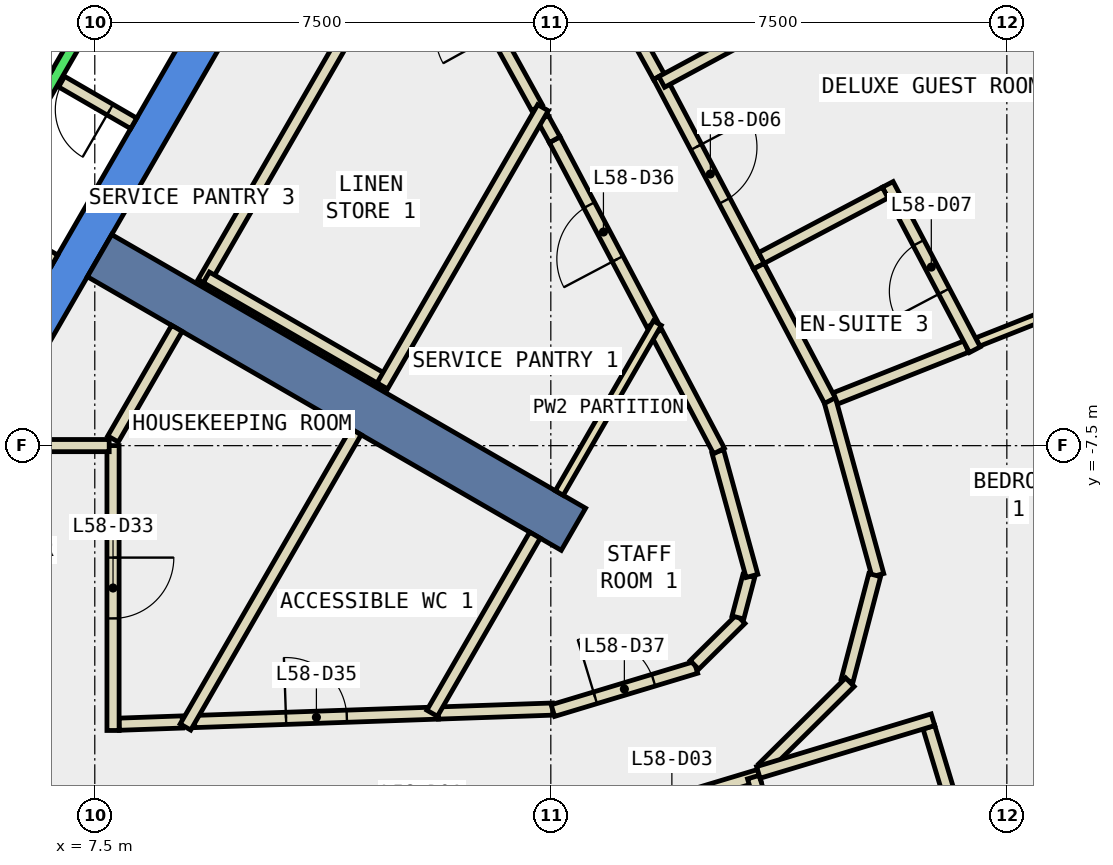
"""IFC4 building model, lengths in metres.
Left out: names, types, materials, properties, quantities, classifications, styles, units other than length and angle.
Written with IfcOpenShell. Run it as: python <this file> out.ifc"""

import sys

from ifc_helpers import new_model, si_unit, direction, frame, frame_2d, origin, origin_2d, place, context, subcontext, project, spatial, polyline, rectangle, outline, extrude, element, fill, save


model = new_model("IFC4")
c1 = context("Model", 3, precision=1e-05, world=origin(), true_north=direction((0.0, 1.0)))
c2 = subcontext(c1, "Body", "Model", "MODEL_VIEW")
j1 = project(units=[si_unit("LENGTHUNIT", "METRE"), si_unit("PLANEANGLEUNIT", "RADIAN")], contexts=[c1])
p1 = place(None, origin())
s1 = spatial("IfcSite", under=j1, at=p1, CompositionType="ELEMENT")
p2 = place(p1, origin())
s2 = spatial("IfcBuilding", under=s1, at=p2, CompositionType="ELEMENT")
p3 = place(p2, frame((0.0, 0.0, 255.8)))
s3 = spatial("IfcBuildingStorey", under=s2, at=p3, CompositionType="ELEMENT", Elevation=255.8)
p4 = place(p3, frame((23.856, -13.774, -0.34), z_axis=(0.0, 0.0, 1.0), x_axis=(-0.866025403784, 0.5, 0.0)))
e1 = element("IfcColumn", 1, at=p4, inside=s3, PredefinedType="COLUMN", context=c2, shape_type="SweptSolid", body=[
    extrude(rectangle(XDim=1.8, YDim=1.8, at=origin_2d()), origin(), (0.0, 0.0, 1.0), 3.6),
])
p5 = place(p3, frame((0.0, 0.0, -0.34)))
e2 = element("IfcWall", 2, at=p5, inside=s3, PredefinedType="SHEAR", context=c2, shape_type="SweptSolid", body=[
    extrude(outline(polyline([(5.774, -7.5), (11.547, 2.5), (10.854, 2.5), (5.427, -6.9), (5.774, -7.5)])), origin(), (0.0, 0.0, 1.0), 3.6),
])
p6 = place(p3, frame((7.578, -4.375, -0.34), z_axis=(0.0, 0.0, 1.0), x_axis=(0.866024315419, -0.5000018851, 0.0)))
e3 = element("IfcWall", 3, at=p6, inside=s3, PredefinedType="SHEAR", context=c2, shape_type="SweptSolid", body=[
    extrude(rectangle(XDim=9.0, YDim=0.8, at=frame_2d((4.5, 0.0))), origin(), (0.0, 0.0, 1.0), 3.6),
])
p7 = place(p3, frame((25.012, -4.07, 0.0), z_axis=(0.0, 0.0, 1.0), x_axis=(-0.466663589714, 0.884434900959, 0.0)))
e4 = element("IfcWall", 4, at=p7, inside=s3, PredefinedType="STANDARD", context=c2, shape_type="SweptSolid", body=[
    extrude(rectangle(XDim=5.638, YDim=0.3, at=frame_2d((2.819, 0.0))), origin(), (0.0, 0.0, 1.0), 3.26),
])
p8 = place(p7, frame((0.459, 0.0, 0.9)))
e5 = element("IfcOpeningElement", 5, at=p8, cuts=e4, PredefinedType="OPENING", context=c2, shape_type="SweptSolid", body=[
    extrude(rectangle(XDim=1.9, YDim=2.0, at=frame_2d((0.95, 1.0))), frame((0.0, 0.16, 0.0), z_axis=(0.0, -1.0, 0.0), x_axis=(1.0, 0.0, 0.0)), (0.0, 0.0, 1.0), 0.32),
])
p9 = place(p7, frame((3.278, 0.0, 0.9)))
e6 = element("IfcOpeningElement", 6, at=p9, cuts=e4, PredefinedType="OPENING", context=c2, shape_type="SweptSolid", body=[
    extrude(rectangle(XDim=1.9, YDim=2.0, at=frame_2d((0.95, 1.0))), frame((0.0, 0.16, 0.0), z_axis=(0.0, -1.0, 0.0), x_axis=(1.0, 0.0, 0.0)), (0.0, 0.0, 1.0), 0.32),
])
p10 = place(p3, frame((7.9, -12.081, 0.0), z_axis=(0.0, 0.0, 1.0), x_axis=(0.999365240621, 0.035624652105, 0.0)))
e7 = element("IfcWall", 7, at=p10, inside=s3, PredefinedType="PARTITIONING", context=c2, shape_type="SweptSolid", body=[
    extrude(rectangle(XDim=1.042, YDim=0.2, at=frame_2d((0.521, 0.0))), origin(), (0.0, 0.0, 1.0), 3.26),
])
p11 = place(p3, frame((14.773, -1.941, 0.0), z_axis=(0.0, 0.0, 1.0), x_axis=(-0.483431586589, 0.875382145744, 0.0)))
e8 = element("IfcWall", 8, at=p11, inside=s3, PredefinedType="PARTITIONING", context=c2, shape_type="SweptSolid", body=[
    extrude(rectangle(XDim=3.771, YDim=0.2, at=frame_2d((1.885, 0.0))), origin(), (0.0, 0.0, 1.0), 3.26),
])
p12 = place(p11, frame((1.385, 0.0, 0.0)))
e9 = element("IfcOpeningElement", 9, at=p12, cuts=e8, PredefinedType="OPENING", context=c2, shape_type="SweptSolid", body=[
    extrude(rectangle(XDim=1.0, YDim=2.1, at=frame_2d((0.5, 1.05))), frame((0.0, 0.11, 0.0), z_axis=(0.0, -1.0, 0.0), x_axis=(1.0, 0.0, 0.0)), (0.0, 0.0, 1.0), 0.22),
])
p13 = place(p3, frame((9.141, -12.037, 0.0), z_axis=(0.0, 0.0, 1.0), x_axis=(0.999388955878, 0.034953038062, 0.0)))
e10 = element("IfcWall", 10, at=p13, inside=s3, PredefinedType="PARTITIONING", context=c2, shape_type="SweptSolid", body=[
    extrude(rectangle(XDim=4.009, YDim=0.2, at=frame_2d((2.005, 0.0))), origin(), (0.0, 0.0, 1.0), 3.26),
])
p14 = place(p13, frame((1.505, 0.0, 0.0)))
e11 = element("IfcOpeningElement", 11, at=p14, cuts=e10, PredefinedType="OPENING", context=c2, shape_type="SweptSolid", body=[
    extrude(rectangle(XDim=1.0, YDim=2.1, at=frame_2d((0.5, 1.05))), frame((0.0, 0.11, 0.0), z_axis=(0.0, -1.0, 0.0), x_axis=(1.0, 0.0, 0.0)), (0.0, 0.0, 1.0), 0.22),
])
p15 = place(p3, frame((16.667, -5.505, 0.0), z_axis=(0.0, 0.0, 1.0), x_axis=(-0.466812680399, 0.884356218624, 0.0)))
e12 = element("IfcWall", 12, at=p15, inside=s3, PredefinedType="PARTITIONING", context=c2, shape_type="SweptSolid", body=[
    extrude(rectangle(XDim=3.434, YDim=0.2, at=frame_2d((1.717, 0.0))), origin(), (0.0, 0.0, 1.0), 3.26),
])
p16 = place(p15, frame((1.217, 0.0, 0.0)))
e13 = element("IfcOpeningElement", 13, at=p16, cuts=e12, PredefinedType="OPENING", context=c2, shape_type="SweptSolid", body=[
    extrude(rectangle(XDim=1.0, YDim=2.1, at=frame_2d((0.5, 1.05))), frame((0.0, 0.11, 0.0), z_axis=(0.0, -1.0, 0.0), x_axis=(1.0, 0.0, 0.0)), (0.0, 0.0, 1.0), 0.22),
])
p17 = place(p3, frame((15.064, -2.468, 0.0), z_axis=(0.0, 0.0, 1.0), x_axis=(-0.482338449744, 0.875984942735, 0.0)))
e14 = element("IfcWall", 14, at=p17, inside=s3, PredefinedType="PARTITIONING", context=c2, shape_type="SweptSolid", body=[
    extrude(rectangle(XDim=0.402, YDim=0.2, at=frame_2d((0.201, 0.0))), origin(), (0.0, 0.0, 1.0), 3.26),
])
p18 = place(p3, frame((13.148, -11.897, 0.0), z_axis=(0.0, 0.0, 1.0), x_axis=(0.999405229262, 0.034484601243, 0.0)))
e15 = element("IfcWall", 15, at=p18, inside=s3, PredefinedType="PARTITIONING", context=c2, shape_type="SweptSolid", body=[
    extrude(rectangle(XDim=1.883, YDim=0.2, at=frame_2d((0.942, 0.0))), origin(), (0.0, 0.0, 1.0), 3.26),
])
p19 = place(p3, frame((15.034, -11.857, 0.0), z_axis=(0.0, 0.0, 1.0), x_axis=(0.957338084933, 0.288970225346, 0.0)))
e16 = element("IfcWall", 16, at=p19, inside=s3, PredefinedType="PARTITIONING", context=c2, shape_type="SweptSolid", body=[
    extrude(rectangle(XDim=2.457, YDim=0.2, at=frame_2d((1.229, 0.0))), origin(), (0.0, 0.0, 1.0), 3.26),
])
p20 = place(p19, frame((0.728, 0.0, 0.0)))
e17 = element("IfcOpeningElement", 17, at=p20, cuts=e16, PredefinedType="OPENING", context=c2, shape_type="SweptSolid", body=[
    extrude(rectangle(XDim=1.0, YDim=2.1, at=frame_2d((0.5, 1.05))), frame((0.0, 0.11, 0.0), z_axis=(0.0, -1.0, 0.0), x_axis=(1.0, 0.0, 0.0)), (0.0, 0.0, 1.0), 0.22),
])
p21 = place(p3, frame((17.362, -11.106, 0.0), z_axis=(0.0, 0.0, 1.0), x_axis=(0.710859741153, 0.703333795866, 0.0)))
e18 = element("IfcWall", 18, at=p21, inside=s3, PredefinedType="PARTITIONING", context=c2, shape_type="SweptSolid", body=[
    extrude(rectangle(XDim=1.071, YDim=0.2, at=frame_2d((0.535, 0.0))), origin(), (0.0, 0.0, 1.0), 3.26),
])
p22 = place(p3, frame((18.077, -10.326, 0.0), z_axis=(0.0, 0.0, 1.0), x_axis=(0.254782174857, 0.966998471237, 0.0)))
e19 = element("IfcWall", 19, at=p22, inside=s3, PredefinedType="PARTITIONING", context=c2, shape_type="SweptSolid", body=[
    extrude(rectangle(XDim=0.707, YDim=0.2, at=frame_2d((0.354, 0.0))), origin(), (0.0, 0.0, 1.0), 3.26),
])
p23 = place(p3, frame((18.308, -9.642, 0.0), z_axis=(0.0, 0.0, 1.0), x_axis=(-0.264859637197, 0.96428697626, 0.0)))
e20 = element("IfcWall", 20, at=p23, inside=s3, PredefinedType="PARTITIONING", context=c2, shape_type="SweptSolid", body=[
    extrude(rectangle(XDim=2.122, YDim=0.2, at=frame_2d((1.061, 0.0))), origin(), (0.0, 0.0, 1.0), 3.26),
])
p24 = place(p3, frame((17.766, -7.588, 0.0), z_axis=(0.0, 0.0, 1.0), x_axis=(-0.466727344864, 0.884401258228, 0.0)))
e21 = element("IfcWall", 21, at=p24, inside=s3, PredefinedType="PARTITIONING", context=c2, shape_type="SweptSolid", body=[
    extrude(rectangle(XDim=2.205, YDim=0.2, at=frame_2d((1.103, 0.0))), origin(), (0.0, 0.0, 1.0), 3.26),
])
p25 = place(p3, frame((18.427, -12.922, 0.0), z_axis=(0.0, 0.0, 1.0), x_axis=(-0.957336631432, -0.288975040651, 0.0)))
e22 = element("IfcWall", 22, at=p25, inside=s3, PredefinedType="PARTITIONING", context=c2, shape_type="SweptSolid", body=[
    extrude(rectangle(XDim=3.0, YDim=0.2, at=frame_2d((1.5, 0.0))), origin(), (0.0, 0.0, 1.0), 3.26),
])
p26 = place(p25, frame((1.0, 0.0, 0.0)))
e23 = element("IfcOpeningElement", 23, at=p26, cuts=e22, PredefinedType="OPENING", context=c2, shape_type="SweptSolid", body=[
    extrude(rectangle(XDim=1.0, YDim=2.1, at=frame_2d((0.5, 1.05))), frame((0.0, 0.11, 0.0), z_axis=(0.0, -1.0, 0.0), x_axis=(1.0, 0.0, 0.0)), (0.0, 0.0, 1.0), 0.22),
])
p27 = place(p3, frame((19.564, -6.662, 0.0), z_axis=(0.0, 0.0, 1.0), x_axis=(0.264876135597, -0.96428244451, 0.0)))
e24 = element("IfcWall", 24, at=p27, inside=s3, PredefinedType="PARTITIONING", context=c2, shape_type="SweptSolid", body=[
    extrude(rectangle(XDim=3.077, YDim=0.2, at=frame_2d((1.538, 0.0))), origin(), (0.0, 0.0, 1.0), 3.26),
])
p28 = place(p3, frame((20.327, -9.629, 0.0), z_axis=(0.0, 0.0, 1.0), x_axis=(-0.253192482031, -0.967415922467, 0.0)))
e25 = element("IfcWall", 25, at=p28, inside=s3, PredefinedType="PARTITIONING", context=c2, shape_type="SweptSolid", body=[
    extrude(rectangle(XDim=1.792, YDim=0.2, at=frame_2d((0.896, 0.0))), origin(), (0.0, 0.0, 1.0), 3.26),
])
p29 = place(p3, frame((19.919, -11.39, 0.0), z_axis=(0.0, 0.0, 1.0), x_axis=(-0.71104667794, -0.70314480855, 0.0)))
e26 = element("IfcWall", 26, at=p29, inside=s3, PredefinedType="PARTITIONING", context=c2, shape_type="SweptSolid", body=[
    extrude(rectangle(XDim=2.008, YDim=0.2, at=frame_2d((1.004, 0.0))), origin(), (0.0, 0.0, 1.0), 3.26),
])
p30 = place(p3, frame((16.778, -1.429, 0.0), z_axis=(0.0, 0.0, 1.0), x_axis=(0.466493865945, -0.884524433261, 0.0)))
e27 = element("IfcWall", 27, at=p30, inside=s3, PredefinedType="PARTITIONING", context=c2, shape_type="SweptSolid", body=[
    extrude(rectangle(XDim=3.526, YDim=0.2, at=frame_2d((1.763, 0.0))), origin(), (0.0, 0.0, 1.0), 3.26),
])
p31 = place(p30, frame((1.313, 0.0, 0.0)))
e28 = element("IfcOpeningElement", 28, at=p31, cuts=e27, PredefinedType="OPENING", context=c2, shape_type="SweptSolid", body=[
    extrude(rectangle(XDim=1.0, YDim=2.1, at=frame_2d((0.5, 1.05))), frame((0.0, 0.11, 0.0), z_axis=(0.0, -1.0, 0.0), x_axis=(1.0, 0.0, 0.0)), (0.0, 0.0, 1.0), 0.22),
])
p32 = place(p3, frame((18.423, -4.548, 0.0), z_axis=(0.0, 0.0, 1.0), x_axis=(0.466792565793, -0.884366835946, 0.0)))
e29 = element("IfcWall", 29, at=p32, inside=s3, PredefinedType="PARTITIONING", context=c2, shape_type="SweptSolid", body=[
    extrude(rectangle(XDim=2.5, YDim=0.2, at=frame_2d((1.25, 0.0))), origin(), (0.0, 0.0, 1.0), 3.26),
])
p33 = place(p3, frame((15.715, 0.491, 0.0), z_axis=(0.0, 0.0, 1.0), x_axis=(0.483421428323, -0.875387755591, 0.0)))
e30 = element("IfcWall", 30, at=p33, inside=s3, PredefinedType="PARTITIONING", context=c2, shape_type="SweptSolid", body=[
    extrude(rectangle(XDim=2.194, YDim=0.2, at=frame_2d((1.097, 0.0))), origin(), (0.0, 0.0, 1.0), 3.26),
])
p34 = place(p3, frame((5.888, -3.902, 0.0), z_axis=(0.0, 0.0, 1.0), x_axis=(0.86621513555, -0.499671230855, 0.0)))
e31 = element("IfcWall", 31, at=p34, inside=s3, PredefinedType="PARTITIONING", context=c2, shape_type="SweptSolid", body=[
    extrude(rectangle(XDim=1.1, YDim=0.2, at=frame_2d((0.55, 0.0))), origin(), (0.0, 0.0, 1.0), 3.26),
])
p35 = place(p3, frame((8.14, -2.2, 0.0), z_axis=(0.0, 0.0, 1.0), x_axis=(-0.865545166185, 0.500830874941, 0.0)))
e32 = element("IfcWall", 32, at=p35, inside=s3, PredefinedType="PARTITIONING", context=c2, shape_type="SweptSolid", body=[
    extrude(rectangle(XDim=1.5, YDim=0.2, at=frame_2d((0.75, 0.0))), origin(), (0.0, 0.0, 1.0), 3.26),
])
p36 = place(p35, frame((0.45, 0.0, 0.0)))
e33 = element("IfcOpeningElement", 33, at=p36, cuts=e32, PredefinedType="OPENING", context=c2, shape_type="SweptSolid", body=[
    extrude(rectangle(XDim=0.9, YDim=2.1, at=frame_2d((0.45, 1.05))), frame((0.0, 0.11, 0.0), z_axis=(0.0, -1.0, 0.0), x_axis=(1.0, 0.0, 0.0)), (0.0, 0.0, 1.0), 0.22),
])
p37 = place(p3, frame((7.8, -7.39, 0.0), z_axis=(0.0, 0.0, 1.0), x_axis=(0.499977374825, 0.866038466041, 0.0)))
e34 = element("IfcWall", 34, at=p37, inside=s3, PredefinedType="PARTITIONING", context=c2, shape_type="SweptSolid", body=[
    extrude(rectangle(XDim=2.1, YDim=0.2, at=frame_2d((1.05, 0.0))), origin(), (0.0, 0.0, 1.0), 3.26),
])
p38 = place(p3, frame((9.285, -4.818, 0.0), z_axis=(0.0, 0.0, 1.0), x_axis=(0.499962569651, 0.866047013128, 0.0)))
e35 = element("IfcWall", 35, at=p38, inside=s3, PredefinedType="PARTITIONING", context=c2, shape_type="SweptSolid", body=[
    extrude(rectangle(XDim=7.334, YDim=0.2, at=frame_2d((3.667, 0.0))), origin(), (0.0, 0.0, 1.0), 3.26),
])
p39 = place(p3, frame((7.8, -7.499, 0.0), z_axis=(0.0, 0.0, 1.0), x_axis=(0.0, -1.0, 0.0)))
e36 = element("IfcWall", 36, at=p39, inside=s3, PredefinedType="PARTITIONING", context=c2, shape_type="SweptSolid", body=[
    extrude(rectangle(XDim=4.685, YDim=0.2, at=frame_2d((2.343, 0.0))), origin(), (0.0, 0.0, 1.0), 3.26),
])
p40 = place(p39, frame((1.842, 0.0, 0.0)))
e37 = element("IfcOpeningElement", 37, at=p40, cuts=e36, PredefinedType="OPENING", context=c2, shape_type="SweptSolid", body=[
    extrude(rectangle(XDim=1.0, YDim=2.1, at=frame_2d((0.5, 1.05))), frame((0.0, 0.11, 0.0), z_axis=(0.0, -1.0, 0.0), x_axis=(1.0, 0.0, 0.0)), (0.0, 0.0, 1.0), 0.22),
])
p41 = place(p3, frame((9.335, -4.732, 0.0), z_axis=(0.0, 0.0, 1.0), x_axis=(0.866002606077, -0.500039484709, 0.0)))
e38 = element("IfcWall", 38, at=p41, inside=s3, PredefinedType="PARTITIONING", context=c2, shape_type="SweptSolid", body=[
    extrude(rectangle(XDim=3.4, YDim=0.2, at=frame_2d((1.7, 0.0))), origin(), (0.0, 0.0, 1.0), 3.26),
])
p42 = place(p3, frame((11.794, -7.271, 0.0), z_axis=(0.0, 0.0, 1.0), x_axis=(-0.499918457185, -0.866072477433, 0.0)))
e39 = element("IfcWall", 39, at=p42, inside=s3, PredefinedType="PARTITIONING", context=c2, shape_type="SweptSolid", body=[
    extrude(rectangle(XDim=5.607, YDim=0.2, at=frame_2d((2.803, 0.0))), origin(), (0.0, 0.0, 1.0), 3.26),
])
p43 = place(p3, frame((14.871, -1.942, 0.0), z_axis=(0.0, 0.0, 1.0), x_axis=(-0.50000507839, -0.866022471755, 0.0)))
e40 = element("IfcWall", 40, at=p43, inside=s3, PredefinedType="PARTITIONING", context=c2, shape_type="SweptSolid", body=[
    extrude(rectangle(XDim=5.284, YDim=0.2, at=frame_2d((2.642, 0.0))), origin(), (0.0, 0.0, 1.0), 3.26),
])
p44 = place(p3, frame((14.739, -8.972, 0.0), z_axis=(0.0, 0.0, 1.0), x_axis=(-0.499974489635, -0.8660401317, 0.0)))
e41 = element("IfcWall", 41, at=p44, inside=s3, PredefinedType="PARTITIONING", context=c2, shape_type="SweptSolid", body=[
    extrude(rectangle(XDim=3.382, YDim=0.2, at=frame_2d((1.691, 0.0))), origin(), (0.0, 0.0, 1.0), 3.26),
])
p45 = place(p3, frame((16.752, -5.485, 0.0), z_axis=(0.0, 0.0, 1.0), x_axis=(-0.499988848364, -0.866031842089, 0.0)))
e42 = element("IfcWall", 42, at=p45, inside=s3, PredefinedType="PARTITIONING", context=c2, shape_type="SweptSolid", body=[
    extrude(rectangle(XDim=3.226, YDim=0.15, at=frame_2d((1.613, 0.0))), origin(), (0.0, 0.0, 1.0), 3.26),
])
p46 = place(p3, frame((18.331, -12.951, 0.0), z_axis=(0.0, 0.0, 1.0), x_axis=(0.289175152117, -0.957276204341, 0.0)))
e43 = element("IfcWall", 43, at=p46, inside=s3, PredefinedType="PARTITIONING", context=c2, shape_type="SweptSolid", body=[
    extrude(rectangle(XDim=2.5, YDim=0.2, at=frame_2d((1.25, 0.0))), origin(), (0.0, 0.0, 1.0), 3.26),
])
p47 = place(p3, frame((21.926, -14.478, 0.0), z_axis=(0.0, 0.0, 1.0), x_axis=(-0.288928787246, 0.957350591947, 0.0)))
e44 = element("IfcWall", 44, at=p47, inside=s3, PredefinedType="PARTITIONING", context=c2, shape_type="SweptSolid", body=[
    extrude(rectangle(XDim=2.45, YDim=0.2, at=frame_2d((1.225, 0.0))), origin(), (0.0, 0.0, 1.0), 3.26),
])
p48 = place(p3, frame((21.285, -12.007, 0.0), z_axis=(0.0, 0.0, 1.0), x_axis=(-0.957329834998, -0.288997555392, 0.0)))
e45 = element("IfcWall", 45, at=p48, inside=s3, PredefinedType="PARTITIONING", context=c2, shape_type="SweptSolid", body=[
    extrude(rectangle(XDim=3.0, YDim=0.2, at=frame_2d((1.5, 0.0))), origin(), (0.0, 0.0, 1.0), 3.26),
])
p49 = place(p3, frame((22.02, -5.796, 0.0), z_axis=(0.0, 0.0, 1.0), x_axis=(0.929915172208, 0.367774078066, 0.0)))
e46 = element("IfcWall", 46, at=p49, inside=s3, PredefinedType="PARTITIONING", context=c2, shape_type="SweptSolid", body=[
    extrude(rectangle(XDim=2.003, YDim=0.15, at=frame_2d((1.002, 0.0))), origin(), (0.0, 0.0, 1.0), 3.26),
])
p50 = place(p3, frame((19.683, -6.722, 0.0), z_axis=(0.0, 0.0, 1.0), x_axis=(0.929744903847, 0.368204309821, 0.0)))
e47 = element("IfcWall", 47, at=p50, inside=s3, PredefinedType="PARTITIONING", context=c2, shape_type="SweptSolid", body=[
    extrude(rectangle(XDim=2.313, YDim=0.2, at=frame_2d((1.157, 0.0))), origin(), (0.0, 0.0, 1.0), 3.26),
])
p51 = place(p3, frame((21.974, -5.922, 0.0), z_axis=(0.0, 0.0, 1.0), x_axis=(-0.466401249432, 0.88457327256, 0.0)))
e48 = element("IfcWall", 48, at=p51, inside=s3, PredefinedType="PARTITIONING", context=c2, shape_type="SweptSolid", body=[
    extrude(rectangle(XDim=3.073, YDim=0.2, at=frame_2d((1.536, 0.0))), origin(), (0.0, 0.0, 1.0), 3.26),
])
p52 = place(p51, frame((1.086, 0.0, 0.0)))
e49 = element("IfcOpeningElement", 49, at=p52, cuts=e48, PredefinedType="OPENING", context=c2, shape_type="SweptSolid", body=[
    extrude(rectangle(XDim=0.9, YDim=2.1, at=frame_2d((0.45, 1.05))), frame((0.0, 0.11, 0.0), z_axis=(0.0, -1.0, 0.0), x_axis=(1.0, 0.0, 0.0)), (0.0, 0.0, 1.0), 0.22),
])
p53 = place(p3, frame((20.499, -3.339, 0.0), z_axis=(0.0, 0.0, 1.0), x_axis=(-0.884293452572, -0.466931568583, 0.0)))
e50 = element("IfcWall", 50, at=p53, inside=s3, PredefinedType="PARTITIONING", context=c2, shape_type="SweptSolid", body=[
    extrude(rectangle(XDim=2.3, YDim=0.2, at=frame_2d((1.15, 0.0))), origin(), (0.0, 0.0, 1.0), 3.26),
])
p54 = place(p3, frame((16.824, -1.518, 0.0), z_axis=(0.0, 0.0, 1.0), x_axis=(0.87996932648, 0.475030508972, 0.0)))
e51 = element("IfcWall", 51, at=p54, inside=s3, PredefinedType="PARTITIONING", context=c2, shape_type="SweptSolid", body=[
    extrude(rectangle(XDim=2.299, YDim=0.2, at=frame_2d((1.149, 0.0))), origin(), (0.0, 0.0, 1.0), 3.26),
])
p55 = place(p3, frame((5.944, -7.499, 0.0), z_axis=(0.0, 0.0, 1.0), x_axis=(1.0, 0.0, 0.0)))
e52 = element("IfcWall", 52, at=p55, inside=s3, PredefinedType="PARTITIONING", context=c2, shape_type="SweptSolid", body=[
    extrude(rectangle(XDim=1.793, YDim=0.2, at=frame_2d((0.896, 0.0))), origin(), (0.0, 0.0, 1.0), 3.26),
])
p56 = place(p3, frame((5.492, -3.788, 0.0), z_axis=(0.0, 0.0, 1.0), x_axis=(0.500034260056, 0.866005622828, 0.0)))
e53 = element("IfcWall", 53, at=p56, inside=s3, PredefinedType="STANDARD", context=c2, shape_type="SweptSolid", body=[
    extrude(rectangle(XDim=5.399, YDim=0.2, at=frame_2d((2.7, 0.0))), origin(), (0.0, 0.0, 1.0), 3.26),
])
p57 = place(p3, frame((4.677, -0.2, 0.0), z_axis=(0.0, 0.0, 1.0), x_axis=(0.865973769406, -0.500089422704, 0.0)))
e54 = element("IfcWall", 54, at=p57, inside=s3, PredefinedType="STANDARD", context=c2, shape_type="SweptSolid", body=[
    extrude(rectangle(XDim=2.399, YDim=0.2, at=frame_2d((1.2, 0.0))), origin(), (0.0, 0.0, 1.0), 3.26),
])
p58 = place(p9, origin())
e55 = element("IfcWindow", 55, at=p58, inside=s3, PartitioningType="SINGLE_PANEL", PredefinedType="WINDOW", context=c2, shape_type="SweptSolid", body=[
    extrude(rectangle(XDim=1.9, YDim=2.0, at=frame_2d((0.95, 1.0))), frame((0.0, 0.03, 0.0), z_axis=(0.0, -1.0, 0.0), x_axis=(1.0, 0.0, 0.0)), (0.0, 0.0, 1.0), 0.06),
])
fill(e6, e55)
p59 = place(p31, origin())
e56 = element("IfcDoor", 56, at=p59, inside=s3, OperationType="SINGLE_SWING_RIGHT", PredefinedType="DOOR", context=c2, shape_type="SweptSolid", body=[
    extrude(rectangle(XDim=1.0, YDim=2.1, at=frame_2d((0.5, 1.05))), frame((0.0, 0.025, 0.0), z_axis=(0.0, -1.0, 0.0), x_axis=(1.0, 0.0, 0.0)), (0.0, 0.0, 1.0), 0.05),
])
fill(e28, e56)
p60 = place(p52, origin())
e57 = element("IfcDoor", 57, at=p60, inside=s3, OperationType="SINGLE_SWING_RIGHT", PredefinedType="DOOR", context=c2, shape_type="SweptSolid", body=[
    extrude(rectangle(XDim=0.9, YDim=2.1, at=frame_2d((0.45, 1.05))), frame((0.0, 0.025, 0.0), z_axis=(0.0, -1.0, 0.0), x_axis=(1.0, 0.0, 0.0)), (0.0, 0.0, 1.0), 0.05),
])
fill(e49, e57)
p61 = place(p40, origin())
e58 = element("IfcDoor", 58, at=p61, inside=s3, OperationType="SINGLE_SWING_LEFT", PredefinedType="DOOR", context=c2, shape_type="SweptSolid", body=[
    extrude(rectangle(XDim=1.0, YDim=2.1, at=frame_2d((0.5, 1.05))), frame((0.0, 0.025, 0.0), z_axis=(0.0, -1.0, 0.0), x_axis=(1.0, 0.0, 0.0)), (0.0, 0.0, 1.0), 0.05),
])
fill(e37, e58)
p62 = place(p14, origin())
e59 = element("IfcDoor", 59, at=p62, inside=s3, OperationType="SINGLE_SWING_LEFT", PredefinedType="DOOR", context=c2, shape_type="SweptSolid", body=[
    extrude(rectangle(XDim=1.0, YDim=2.1, at=frame_2d((0.5, 1.05))), frame((0.0, 0.025, 0.0), z_axis=(0.0, -1.0, 0.0), x_axis=(1.0, 0.0, 0.0)), (0.0, 0.0, 1.0), 0.05),
])
fill(e11, e59)
p63 = place(p16, origin())
e60 = element("IfcDoor", 60, at=p63, inside=s3, OperationType="SINGLE_SWING_RIGHT", PredefinedType="DOOR", context=c2, shape_type="SweptSolid", body=[
    extrude(rectangle(XDim=1.0, YDim=2.1, at=frame_2d((0.5, 1.05))), frame((0.0, 0.025, 0.0), z_axis=(0.0, -1.0, 0.0), x_axis=(1.0, 0.0, 0.0)), (0.0, 0.0, 1.0), 0.05),
])
fill(e13, e60)
p64 = place(p20, origin())
e61 = element("IfcDoor", 61, at=p64, inside=s3, OperationType="SINGLE_SWING_LEFT", PredefinedType="DOOR", context=c2, shape_type="SweptSolid", body=[
    extrude(rectangle(XDim=1.0, YDim=2.1, at=frame_2d((0.5, 1.05))), frame((0.0, 0.025, 0.0), z_axis=(0.0, -1.0, 0.0), x_axis=(1.0, 0.0, 0.0)), (0.0, 0.0, 1.0), 0.05),
])
fill(e17, e61)
p65 = place(p36, origin())
e62 = element("IfcDoor", 62, at=p65, inside=s3, OperationType="SINGLE_SWING_LEFT", PredefinedType="DOOR", context=c2, shape_type="SweptSolid", body=[
    extrude(rectangle(XDim=0.9, YDim=2.1, at=frame_2d((0.45, 1.05))), frame((0.0, 0.025, 0.0), z_axis=(0.0, -1.0, 0.0), x_axis=(1.0, 0.0, 0.0)), (0.0, 0.0, 1.0), 0.05),
])
fill(e33, e62)
save(model, sys.argv[1])
